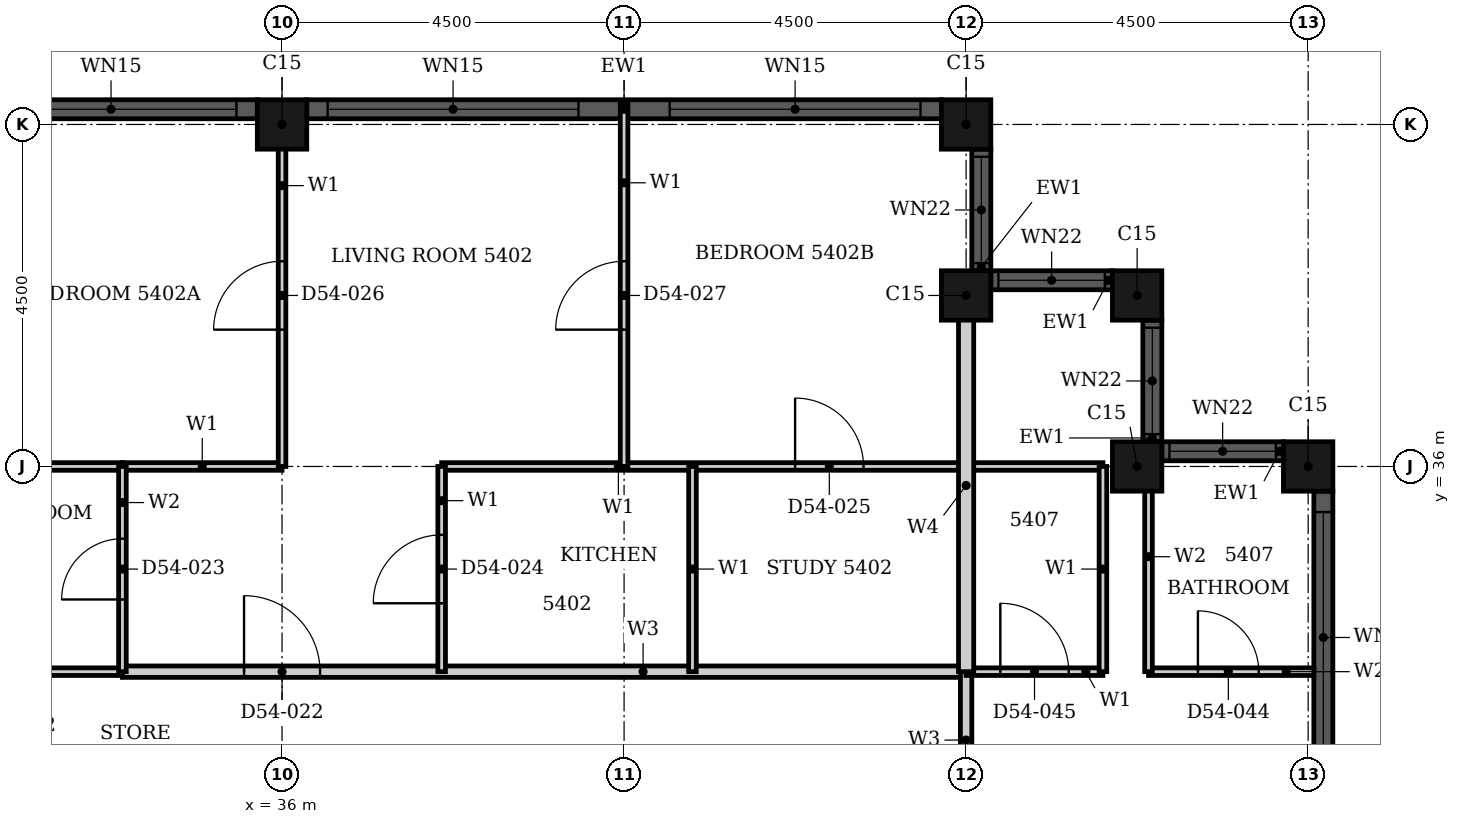
"""IFC4 building model, lengths in metres.
Left out: names, types, materials, properties, quantities, classifications, styles, units other than length and angle.
Written with IfcOpenShell. Run it as: python <this file> out.ifc"""

import sys

from ifc_helpers import new_model, si_unit, direction, frame, frame_2d, origin, origin_2d, place, context, subcontext, project, spatial, rectangle, hollow_rectangle, extrude, element, fill, save


model = new_model("IFC4")
c1 = context("Model", 3, precision=1e-05, world=origin(), true_north=direction((0.0, 1.0)))
c2 = subcontext(c1, "Body", "Model", "MODEL_VIEW")
j1 = project(units=[si_unit("LENGTHUNIT", "METRE"), si_unit("PLANEANGLEUNIT", "RADIAN")], contexts=[c1])
p1 = place(None, origin())
s1 = spatial("IfcSite", under=j1, at=p1, CompositionType="ELEMENT")
p2 = place(p1, origin())
s2 = spatial("IfcBuilding", under=s1, at=p2, CompositionType="ELEMENT")
p3 = place(p2, frame((0.0, 0.0, 214.6)))
s3 = spatial("IfcBuildingStorey", under=s2, at=p3, CompositionType="ELEMENT", Elevation=214.6)
for number, where, z_axis, x_axis in (
    (1, (49.5, 36.0, 0.0), (0.0, 0.0, 1.0), (1.0, 0.0, 0.0)),
    (2, (47.25, 36.0, 0.0), (0.0, 0.0, 1.0), (1.0, 0.0, 0.0)),
    (3, (47.25, 38.25, 0.0), (0.0, 0.0, 1.0), (1.0, 0.0, 0.0)),
    (4, (45.0, 38.25, 0.0), (0.0, 0.0, 1.0), (1.0, 0.0, 0.0)),
    (5, (45.0, 40.5, 0.0), (0.0, 0.0, 1.0), (1.0, 0.0, 0.0)),
    (6, (36.0, 40.5, 0.0), (0.0, 0.0, 1.0), (1.0, 0.0, 0.0)),
):
    element("IfcColumn", number, at=place(p3, frame(where, z_axis=z_axis, x_axis=x_axis)), inside=s3, PredefinedType="COLUMN", context=c2, shape_type="SweptSolid", body=[
        extrude(hollow_rectangle(XDim=0.65, YDim=0.65, WallThickness=0.021, at=origin_2d()), origin(), (0.0, 0.0, 1.0), 3.7),
    ])
p4 = place(p3, frame((49.7, 27.325, 0.0), z_axis=(0.0, 0.0, 1.0), x_axis=(0.0, 1.0, 0.0)))
e7 = element("IfcWall", 7, at=p4, inside=s3, PredefinedType="SOLIDWALL", context=c2, shape_type="SweptSolid", body=[
    extrude(rectangle(XDim=8.35, YDim=0.25, at=frame_2d((4.175, 0.0))), origin(), (0.0, 0.0, 1.0), 3.7),
])
p5 = place(p4, frame((0.275, 0.0, 0.45)))
e8 = element("IfcOpeningElement", 8, at=p5, cuts=e7, PredefinedType="OPENING", context=c2, shape_type="SweptSolid", body=[
    extrude(rectangle(XDim=3.3, YDim=2.3, at=frame_2d((1.65, 1.15))), frame((0.0, 0.135, 0.0), z_axis=(0.0, -1.0, 0.0), x_axis=(1.0, 0.0, 0.0)), (0.0, 0.0, 1.0), 0.27),
])
p6 = place(p4, frame((4.775, 0.0, 0.45)))
e9 = element("IfcOpeningElement", 9, at=p6, cuts=e7, PredefinedType="OPENING", context=c2, shape_type="SweptSolid", body=[
    extrude(rectangle(XDim=3.3, YDim=2.3, at=frame_2d((1.65, 1.15))), frame((0.0, 0.135, 0.0), z_axis=(0.0, -1.0, 0.0), x_axis=(1.0, 0.0, 0.0)), (0.0, 0.0, 1.0), 0.27),
])
p7 = place(p3, frame((49.175, 36.2, 0.0), z_axis=(0.0, 0.0, 1.0), x_axis=(-1.0, 0.0, 0.0)))
e10 = element("IfcWall", 10, at=p7, inside=s3, PredefinedType="SOLIDWALL", context=c2, shape_type="SweptSolid", body=[
    extrude(rectangle(XDim=1.6, YDim=0.25, at=frame_2d((0.8, 0.0))), origin(), (0.0, 0.0, 1.0), 3.7),
])
p8 = place(p7, frame((0.1, 0.0, 0.9)))
e11 = element("IfcOpeningElement", 11, at=p8, cuts=e10, PredefinedType="OPENING", context=c2, shape_type="SweptSolid", body=[
    extrude(rectangle(XDim=1.4, YDim=1.85, at=frame_2d((0.7, 0.925))), frame((0.0, 0.135, 0.0), z_axis=(0.0, -1.0, 0.0), x_axis=(1.0, 0.0, 0.0)), (0.0, 0.0, 1.0), 0.27),
])
p9 = place(p3, frame((47.45, 36.325, 0.0), z_axis=(0.0, 0.0, 1.0), x_axis=(0.0, 1.0, 0.0)))
e12 = element("IfcWall", 12, at=p9, inside=s3, PredefinedType="SOLIDWALL", context=c2, shape_type="SweptSolid", body=[
    extrude(rectangle(XDim=1.6, YDim=0.25, at=frame_2d((0.8, 0.0))), origin(), (0.0, 0.0, 1.0), 3.7),
])
p10 = place(p9, frame((0.1, 0.0, 0.9)))
e13 = element("IfcOpeningElement", 13, at=p10, cuts=e12, PredefinedType="OPENING", context=c2, shape_type="SweptSolid", body=[
    extrude(rectangle(XDim=1.4, YDim=1.85, at=frame_2d((0.7, 0.925))), frame((0.0, 0.135, 0.0), z_axis=(0.0, -1.0, 0.0), x_axis=(1.0, 0.0, 0.0)), (0.0, 0.0, 1.0), 0.27),
])
p11 = place(p3, frame((46.925, 38.45, 0.0), z_axis=(0.0, 0.0, 1.0), x_axis=(-1.0, 0.0, 0.0)))
e14 = element("IfcWall", 14, at=p11, inside=s3, PredefinedType="SOLIDWALL", context=c2, shape_type="SweptSolid", body=[
    extrude(rectangle(XDim=1.6, YDim=0.25, at=frame_2d((0.8, 0.0))), origin(), (0.0, 0.0, 1.0), 3.7),
])
p12 = place(p11, frame((0.1, 0.0, 0.9)))
e15 = element("IfcOpeningElement", 15, at=p12, cuts=e14, PredefinedType="OPENING", context=c2, shape_type="SweptSolid", body=[
    extrude(rectangle(XDim=1.4, YDim=1.85, at=frame_2d((0.7, 0.925))), frame((0.0, 0.135, 0.0), z_axis=(0.0, -1.0, 0.0), x_axis=(1.0, 0.0, 0.0)), (0.0, 0.0, 1.0), 0.27),
])
p13 = place(p3, frame((45.2, 38.575, 0.0), z_axis=(0.0, 0.0, 1.0), x_axis=(0.0, 1.0, 0.0)))
e16 = element("IfcWall", 16, at=p13, inside=s3, PredefinedType="SOLIDWALL", context=c2, shape_type="SweptSolid", body=[
    extrude(rectangle(XDim=1.6, YDim=0.25, at=frame_2d((0.8, 0.0))), origin(), (0.0, 0.0, 1.0), 3.7),
])
p14 = place(p13, frame((0.1, 0.0, 0.9)))
e17 = element("IfcOpeningElement", 17, at=p14, cuts=e16, PredefinedType="OPENING", context=c2, shape_type="SweptSolid", body=[
    extrude(rectangle(XDim=1.4, YDim=1.85, at=frame_2d((0.7, 0.925))), frame((0.0, 0.135, 0.0), z_axis=(0.0, -1.0, 0.0), x_axis=(1.0, 0.0, 0.0)), (0.0, 0.0, 1.0), 0.27),
])
p15 = place(p3, frame((44.675, 40.7, 0.0), z_axis=(0.0, 0.0, 1.0), x_axis=(-1.0, 0.0, 0.0)))
e18 = element("IfcWall", 18, at=p15, inside=s3, PredefinedType="SOLIDWALL", context=c2, shape_type="SweptSolid", body=[
    extrude(rectangle(XDim=8.35, YDim=0.25, at=frame_2d((4.175, 0.0))), origin(), (0.0, 0.0, 1.0), 3.7),
])
p16 = place(p15, frame((0.275, 0.0, 0.45)))
e19 = element("IfcOpeningElement", 19, at=p16, cuts=e18, PredefinedType="OPENING", context=c2, shape_type="SweptSolid", body=[
    extrude(rectangle(XDim=3.3, YDim=2.3, at=frame_2d((1.65, 1.15))), frame((0.0, 0.135, 0.0), z_axis=(0.0, -1.0, 0.0), x_axis=(1.0, 0.0, 0.0)), (0.0, 0.0, 1.0), 0.27),
])
p17 = place(p15, frame((4.775, 0.0, 0.45)))
e20 = element("IfcOpeningElement", 20, at=p17, cuts=e18, PredefinedType="OPENING", context=c2, shape_type="SweptSolid", body=[
    extrude(rectangle(XDim=3.3, YDim=2.3, at=frame_2d((1.65, 1.15))), frame((0.0, 0.135, 0.0), z_axis=(0.0, -1.0, 0.0), x_axis=(1.0, 0.0, 0.0)), (0.0, 0.0, 1.0), 0.27),
])
p18 = place(p3, frame((35.675, 40.7, 0.0), z_axis=(0.0, 0.0, 1.0), x_axis=(-1.0, 0.0, 0.0)))
e21 = element("IfcWall", 21, at=p18, inside=s3, PredefinedType="SOLIDWALL", context=c2, shape_type="SweptSolid", body=[
    extrude(rectangle(XDim=8.35, YDim=0.25, at=frame_2d((4.175, 0.0))), origin(), (0.0, 0.0, 1.0), 3.7),
])
p19 = place(p18, frame((0.275, 0.0, 0.45)))
e22 = element("IfcOpeningElement", 22, at=p19, cuts=e21, PredefinedType="OPENING", context=c2, shape_type="SweptSolid", body=[
    extrude(rectangle(XDim=3.3, YDim=2.3, at=frame_2d((1.65, 1.15))), frame((0.0, 0.135, 0.0), z_axis=(0.0, -1.0, 0.0), x_axis=(1.0, 0.0, 0.0)), (0.0, 0.0, 1.0), 0.27),
])
p20 = place(p18, frame((4.775, 0.0, 0.45)))
e23 = element("IfcOpeningElement", 23, at=p20, cuts=e21, PredefinedType="OPENING", context=c2, shape_type="SweptSolid", body=[
    extrude(rectangle(XDim=3.3, YDim=2.3, at=frame_2d((1.65, 1.15))), frame((0.0, 0.135, 0.0), z_axis=(0.0, -1.0, 0.0), x_axis=(1.0, 0.0, 0.0)), (0.0, 0.0, 1.0), 0.27),
])
p21 = place(p3, frame((33.9, 33.3, 0.0), z_axis=(0.0, 0.0, 1.0), x_axis=(1.0, 0.0, 0.0)))
e24 = element("IfcWall", 24, at=p21, inside=s3, PredefinedType="PARTITIONING", context=c2, shape_type="SweptSolid", body=[
    extrude(rectangle(XDim=11.1, YDim=0.15, at=frame_2d((5.55, 0.0))), origin(), (0.0, 0.0, 1.0), 3.4),
])
p22 = place(p21, frame((1.6, 0.0, 0.0)))
e25 = element("IfcOpeningElement", 25, at=p22, cuts=e24, PredefinedType="OPENING", context=c2, shape_type="SweptSolid", body=[
    extrude(rectangle(XDim=1.0, YDim=2.2, at=frame_2d((0.5, 1.1))), frame((0.0, 0.085, 0.0), z_axis=(0.0, -1.0, 0.0), x_axis=(1.0, 0.0, 0.0)), (0.0, 0.0, 1.0), 0.17),
])
p23 = place(p3, frame((45.0, 31.5, 0.0), z_axis=(0.0, 0.0, 1.0), x_axis=(0.0, 1.0, 0.0)))
e26 = element("IfcWall", 26, at=p23, inside=s3, PredefinedType="PARTITIONING", context=c2, shape_type="SweptSolid", body=[
    extrude(rectangle(XDim=1.8, YDim=0.15, at=frame_2d((0.9, 0.0))), origin(), (0.0, 0.0, 1.0), 3.4),
])
p24 = place(p3, frame((45.0, 33.3, 0.0), z_axis=(0.0, 0.0, 1.0), x_axis=(1.0, 0.0, 0.0)))
e27 = element("IfcWall", 27, at=p24, inside=s3, PredefinedType="PARTITIONING", context=c2, shape_type="SweptSolid", body=[
    extrude(rectangle(XDim=1.8, YDim=0.1, at=frame_2d((0.9, 0.0))), origin(), (0.0, 0.0, 1.0), 3.4),
])
p25 = place(p24, frame((0.45, 0.0, 0.0)))
e28 = element("IfcOpeningElement", 28, at=p25, cuts=e27, PredefinedType="OPENING", context=c2, shape_type="SweptSolid", body=[
    extrude(rectangle(XDim=0.9, YDim=2.1, at=frame_2d((0.45, 1.05))), frame((0.0, 0.06, 0.0), z_axis=(0.0, -1.0, 0.0), x_axis=(1.0, 0.0, 0.0)), (0.0, 0.0, 1.0), 0.12),
])
p26 = place(p3, frame((33.9, 36.0, 0.0), z_axis=(0.0, 0.0, 1.0), x_axis=(1.0, 0.0, 0.0)))
e29 = element("IfcWall", 29, at=p26, inside=s3, PredefinedType="PARTITIONING", context=c2, shape_type="SweptSolid", body=[
    extrude(rectangle(XDim=2.1, YDim=0.1, at=frame_2d((1.05, 0.0))), origin(), (0.0, 0.0, 1.0), 3.4),
])
p27 = place(p3, frame((38.1, 36.0, 0.0), z_axis=(0.0, 0.0, 1.0), x_axis=(1.0, 0.0, 0.0)))
e30 = element("IfcWall", 30, at=p27, inside=s3, PredefinedType="PARTITIONING", context=c2, shape_type="SweptSolid", body=[
    extrude(rectangle(XDim=8.7, YDim=0.1, at=frame_2d((4.35, 0.0))), origin(), (0.0, 0.0, 1.0), 3.4),
])
p28 = place(p27, frame((4.65, 0.0, 0.0)))
e31 = element("IfcOpeningElement", 31, at=p28, cuts=e30, PredefinedType="OPENING", context=c2, shape_type="SweptSolid", body=[
    extrude(rectangle(XDim=0.9, YDim=2.1, at=frame_2d((0.45, 1.05))), frame((0.0, 0.06, 0.0), z_axis=(0.0, -1.0, 0.0), x_axis=(1.0, 0.0, 0.0)), (0.0, 0.0, 1.0), 0.12),
])
p29 = place(p3, frame((36.0, 36.0, 0.0), z_axis=(0.0, 0.0, 1.0), x_axis=(0.0, 1.0, 0.0)))
e32 = element("IfcWall", 32, at=p29, inside=s3, PredefinedType="PARTITIONING", context=c2, shape_type="SweptSolid", body=[
    extrude(rectangle(XDim=4.69, YDim=0.1, at=frame_2d((2.345, 0.0))), origin(), (0.0, 0.0, 1.0), 3.4),
])
p30 = place(p29, frame((1.8, 0.0, 0.0)))
e33 = element("IfcOpeningElement", 33, at=p30, cuts=e32, PredefinedType="OPENING", context=c2, shape_type="SweptSolid", body=[
    extrude(rectangle(XDim=0.9, YDim=2.1, at=frame_2d((0.45, 1.05))), frame((0.0, 0.06, 0.0), z_axis=(0.0, -1.0, 0.0), x_axis=(1.0, 0.0, 0.0)), (0.0, 0.0, 1.0), 0.12),
])
p31 = place(p3, frame((38.1, 33.3, 0.0), z_axis=(0.0, 0.0, 1.0), x_axis=(0.0, 1.0, 0.0)))
e34 = element("IfcWall", 34, at=p31, inside=s3, PredefinedType="PARTITIONING", context=c2, shape_type="SweptSolid", body=[
    extrude(rectangle(XDim=2.7, YDim=0.1, at=frame_2d((1.35, 0.0))), origin(), (0.0, 0.0, 1.0), 3.4),
])
p32 = place(p31, frame((0.9, 0.0, 0.0)))
e35 = element("IfcOpeningElement", 35, at=p32, cuts=e34, PredefinedType="OPENING", context=c2, shape_type="SweptSolid", body=[
    extrude(rectangle(XDim=0.9, YDim=2.1, at=frame_2d((0.45, 1.05))), frame((0.0, 0.06, 0.0), z_axis=(0.0, -1.0, 0.0), x_axis=(1.0, 0.0, 0.0)), (0.0, 0.0, 1.0), 0.12),
])
p33 = place(p3, frame((40.5, 36.0, 0.0), z_axis=(0.0, 0.0, 1.0), x_axis=(0.0, 1.0, 0.0)))
e36 = element("IfcWall", 36, at=p33, inside=s3, PredefinedType="PARTITIONING", context=c2, shape_type="SweptSolid", body=[
    extrude(rectangle(XDim=4.765, YDim=0.1, at=frame_2d((2.382, 0.0))), origin(), (0.0, 0.0, 1.0), 3.4),
])
p34 = place(p33, frame((1.8, 0.0, 0.0)))
e37 = element("IfcOpeningElement", 37, at=p34, cuts=e36, PredefinedType="OPENING", context=c2, shape_type="SweptSolid", body=[
    extrude(rectangle(XDim=0.9, YDim=2.1, at=frame_2d((0.45, 1.05))), frame((0.0, 0.06, 0.0), z_axis=(0.0, -1.0, 0.0), x_axis=(1.0, 0.0, 0.0)), (0.0, 0.0, 1.0), 0.12),
])
for number, where, z_axis, x_axis in (
    (38, (41.4, 33.3, 0.0), (0.0, 0.0, 1.0), (0.0, 1.0, 0.0)),
    (39, (46.8, 33.3, 0.0), (0.0, 0.0, 1.0), (0.0, 1.0, 0.0)),
):
    element("IfcWall", number, at=place(p3, frame(where, z_axis=z_axis, x_axis=x_axis)), inside=s3, PredefinedType="PARTITIONING", context=c2, shape_type="SweptSolid", body=[
        extrude(rectangle(XDim=2.7, YDim=0.1, at=frame_2d((1.35, 0.0))), origin(), (0.0, 0.0, 1.0), 3.4),
    ])
p35 = place(p3, frame((45.0, 33.3, 0.0), z_axis=(0.0, 0.0, 1.0), x_axis=(0.0, 1.0, 0.0)))
e40 = element("IfcWall", 40, at=p35, inside=s3, PredefinedType="PARTITIONING", context=c2, shape_type="SweptSolid", body=[
    extrude(rectangle(XDim=4.9, YDim=0.2, at=frame_2d((2.45, 0.0))), origin(), (0.0, 0.0, 1.0), 3.4),
])
p36 = place(p3, frame((31.5, 33.3, 0.0), z_axis=(0.0, 0.0, 1.0), x_axis=(1.0, 0.0, 0.0)))
e41 = element("IfcWall", 41, at=p36, inside=s3, PredefinedType="PARTITIONING", context=c2, shape_type="SweptSolid", body=[
    extrude(rectangle(XDim=2.4, YDim=0.1, at=frame_2d((1.2, 0.0))), origin(), (0.0, 0.0, 1.0), 3.4),
])
p37 = place(p3, frame((47.4, 33.3, 0.0), z_axis=(0.0, 0.0, 1.0), x_axis=(1.0, 0.0, 0.0)))
e42 = element("IfcWall", 42, at=p37, inside=s3, PredefinedType="PARTITIONING", context=c2, shape_type="SweptSolid", body=[
    extrude(rectangle(XDim=2.175, YDim=0.1, at=frame_2d((1.087, 0.0))), origin(), (0.0, 0.0, 1.0), 3.4),
])
p38 = place(p37, frame((0.65, 0.0, 0.0)))
e43 = element("IfcOpeningElement", 43, at=p38, cuts=e42, PredefinedType="OPENING", context=c2, shape_type="SweptSolid", body=[
    extrude(rectangle(XDim=0.8, YDim=2.1, at=frame_2d((0.4, 1.05))), frame((0.0, 0.06, 0.0), z_axis=(0.0, -1.0, 0.0), x_axis=(1.0, 0.0, 0.0)), (0.0, 0.0, 1.0), 0.12),
])
p39 = place(p3, frame((31.5, 36.0, 0.0), z_axis=(0.0, 0.0, 1.0), x_axis=(1.0, 0.0, 0.0)))
e44 = element("IfcWall", 44, at=p39, inside=s3, PredefinedType="PARTITIONING", context=c2, shape_type="SweptSolid", body=[
    extrude(rectangle(XDim=2.4, YDim=0.1, at=frame_2d((1.2, 0.0))), origin(), (0.0, 0.0, 1.0), 3.4),
])
p40 = place(p3, frame((33.9, 33.3, 0.0), z_axis=(0.0, 0.0, 1.0), x_axis=(0.0, 1.0, 0.0)))
e45 = element("IfcWall", 45, at=p40, inside=s3, PredefinedType="PARTITIONING", context=c2, shape_type="SweptSolid", body=[
    extrude(rectangle(XDim=2.7, YDim=0.1, at=frame_2d((1.35, 0.0))), origin(), (0.0, 0.0, 1.0), 3.4),
])
p41 = place(p40, frame((0.95, 0.0, 0.0)))
e46 = element("IfcOpeningElement", 46, at=p41, cuts=e45, PredefinedType="OPENING", context=c2, shape_type="SweptSolid", body=[
    extrude(rectangle(XDim=0.8, YDim=2.1, at=frame_2d((0.4, 1.05))), frame((0.0, 0.06, 0.0), z_axis=(0.0, -1.0, 0.0), x_axis=(1.0, 0.0, 0.0)), (0.0, 0.0, 1.0), 0.12),
])
p42 = place(p3, frame((47.4, 33.3, 0.0), z_axis=(0.0, 0.0, 1.0), x_axis=(0.0, 1.0, 0.0)))
e47 = element("IfcWall", 47, at=p42, inside=s3, PredefinedType="PARTITIONING", context=c2, shape_type="SweptSolid", body=[
    extrude(rectangle(XDim=3.025, YDim=0.1, at=frame_2d((1.512, 0.0))), origin(), (0.0, 0.0, 1.0), 3.4),
])
p43 = place(p6, origin())
e48 = element("IfcWindow", 48, at=p43, inside=s3, PartitioningType="SINGLE_PANEL", PredefinedType="WINDOW", context=c2, shape_type="SweptSolid", body=[
    extrude(rectangle(XDim=3.3, YDim=2.3, at=frame_2d((1.65, 1.15))), frame((0.0, 0.03, 0.0), z_axis=(0.0, -1.0, 0.0), x_axis=(1.0, 0.0, 0.0)), (0.0, 0.0, 1.0), 0.06),
])
fill(e9, e48)
p44 = place(p8, origin())
e49 = element("IfcWindow", 49, at=p44, inside=s3, PartitioningType="SINGLE_PANEL", PredefinedType="WINDOW", context=c2, shape_type="SweptSolid", body=[
    extrude(rectangle(XDim=1.4, YDim=1.85, at=frame_2d((0.7, 0.925))), frame((0.0, 0.03, 0.0), z_axis=(0.0, -1.0, 0.0), x_axis=(1.0, 0.0, 0.0)), (0.0, 0.0, 1.0), 0.06),
])
fill(e11, e49)
p45 = place(p10, origin())
e50 = element("IfcWindow", 50, at=p45, inside=s3, PartitioningType="SINGLE_PANEL", PredefinedType="WINDOW", context=c2, shape_type="SweptSolid", body=[
    extrude(rectangle(XDim=1.4, YDim=1.85, at=frame_2d((0.7, 0.925))), frame((0.0, 0.03, 0.0), z_axis=(0.0, -1.0, 0.0), x_axis=(1.0, 0.0, 0.0)), (0.0, 0.0, 1.0), 0.06),
])
fill(e13, e50)
p46 = place(p12, origin())
e51 = element("IfcWindow", 51, at=p46, inside=s3, PartitioningType="SINGLE_PANEL", PredefinedType="WINDOW", context=c2, shape_type="SweptSolid", body=[
    extrude(rectangle(XDim=1.4, YDim=1.85, at=frame_2d((0.7, 0.925))), frame((0.0, 0.03, 0.0), z_axis=(0.0, -1.0, 0.0), x_axis=(1.0, 0.0, 0.0)), (0.0, 0.0, 1.0), 0.06),
])
fill(e15, e51)
p47 = place(p14, origin())
e52 = element("IfcWindow", 52, at=p47, inside=s3, PartitioningType="SINGLE_PANEL", PredefinedType="WINDOW", context=c2, shape_type="SweptSolid", body=[
    extrude(rectangle(XDim=1.4, YDim=1.85, at=frame_2d((0.7, 0.925))), frame((0.0, 0.03, 0.0), z_axis=(0.0, -1.0, 0.0), x_axis=(1.0, 0.0, 0.0)), (0.0, 0.0, 1.0), 0.06),
])
fill(e17, e52)
p48 = place(p16, origin())
e53 = element("IfcWindow", 53, at=p48, inside=s3, PartitioningType="SINGLE_PANEL", PredefinedType="WINDOW", context=c2, shape_type="SweptSolid", body=[
    extrude(rectangle(XDim=3.3, YDim=2.3, at=frame_2d((1.65, 1.15))), frame((0.0, 0.03, 0.0), z_axis=(0.0, -1.0, 0.0), x_axis=(1.0, 0.0, 0.0)), (0.0, 0.0, 1.0), 0.06),
])
fill(e19, e53)
p49 = place(p17, origin())
e54 = element("IfcWindow", 54, at=p49, inside=s3, PartitioningType="SINGLE_PANEL", PredefinedType="WINDOW", context=c2, shape_type="SweptSolid", body=[
    extrude(rectangle(XDim=3.3, YDim=2.3, at=frame_2d((1.65, 1.15))), frame((0.0, 0.03, 0.0), z_axis=(0.0, -1.0, 0.0), x_axis=(1.0, 0.0, 0.0)), (0.0, 0.0, 1.0), 0.06),
])
fill(e20, e54)
p50 = place(p19, origin())
e55 = element("IfcWindow", 55, at=p50, inside=s3, PartitioningType="SINGLE_PANEL", PredefinedType="WINDOW", context=c2, shape_type="SweptSolid", body=[
    extrude(rectangle(XDim=3.3, YDim=2.3, at=frame_2d((1.65, 1.15))), frame((0.0, 0.03, 0.0), z_axis=(0.0, -1.0, 0.0), x_axis=(1.0, 0.0, 0.0)), (0.0, 0.0, 1.0), 0.06),
])
fill(e22, e55)
p51 = place(p22, origin())
e56 = element("IfcDoor", 56, at=p51, inside=s3, OperationType="SINGLE_SWING_LEFT", PredefinedType="DOOR", context=c2, shape_type="SweptSolid", body=[
    extrude(rectangle(XDim=1.0, YDim=2.2, at=frame_2d((0.5, 1.1))), frame((0.0, 0.025, 0.0), z_axis=(0.0, -1.0, 0.0), x_axis=(1.0, 0.0, 0.0)), (0.0, 0.0, 1.0), 0.05),
])
fill(e25, e56)
p52 = place(p41, origin())
e57 = element("IfcDoor", 57, at=p52, inside=s3, OperationType="SINGLE_SWING_LEFT", PredefinedType="DOOR", context=c2, shape_type="SweptSolid", body=[
    extrude(rectangle(XDim=0.8, YDim=2.1, at=frame_2d((0.4, 1.05))), frame((0.0, 0.025, 0.0), z_axis=(0.0, -1.0, 0.0), x_axis=(1.0, 0.0, 0.0)), (0.0, 0.0, 1.0), 0.05),
])
fill(e46, e57)
p53 = place(p32, origin())
e58 = element("IfcDoor", 58, at=p53, inside=s3, OperationType="SINGLE_SWING_LEFT", PredefinedType="DOOR", context=c2, shape_type="SweptSolid", body=[
    extrude(rectangle(XDim=0.9, YDim=2.1, at=frame_2d((0.45, 1.05))), frame((0.0, 0.025, 0.0), z_axis=(0.0, -1.0, 0.0), x_axis=(1.0, 0.0, 0.0)), (0.0, 0.0, 1.0), 0.05),
])
fill(e35, e58)
p54 = place(p28, origin())
e59 = element("IfcDoor", 59, at=p54, inside=s3, OperationType="SINGLE_SWING_LEFT", PredefinedType="DOOR", context=c2, shape_type="SweptSolid", body=[
    extrude(rectangle(XDim=0.9, YDim=2.1, at=frame_2d((0.45, 1.05))), frame((0.0, 0.025, 0.0), z_axis=(0.0, -1.0, 0.0), x_axis=(1.0, 0.0, 0.0)), (0.0, 0.0, 1.0), 0.05),
])
fill(e31, e59)
p55 = place(p30, origin())
e60 = element("IfcDoor", 60, at=p55, inside=s3, OperationType="SINGLE_SWING_RIGHT", PredefinedType="DOOR", context=c2, shape_type="SweptSolid", body=[
    extrude(rectangle(XDim=0.9, YDim=2.1, at=frame_2d((0.45, 1.05))), frame((0.0, 0.025, 0.0), z_axis=(0.0, -1.0, 0.0), x_axis=(1.0, 0.0, 0.0)), (0.0, 0.0, 1.0), 0.05),
])
fill(e33, e60)
p56 = place(p34, origin())
e61 = element("IfcDoor", 61, at=p56, inside=s3, OperationType="SINGLE_SWING_LEFT", PredefinedType="DOOR", context=c2, shape_type="SweptSolid", body=[
    extrude(rectangle(XDim=0.9, YDim=2.1, at=frame_2d((0.45, 1.05))), frame((0.0, 0.025, 0.0), z_axis=(0.0, -1.0, 0.0), x_axis=(1.0, 0.0, 0.0)), (0.0, 0.0, 1.0), 0.05),
])
fill(e37, e61)
p57 = place(p38, origin())
e62 = element("IfcDoor", 62, at=p57, inside=s3, OperationType="SINGLE_SWING_RIGHT", PredefinedType="DOOR", context=c2, shape_type="SweptSolid", body=[
    extrude(rectangle(XDim=0.8, YDim=2.1, at=frame_2d((0.4, 1.05))), frame((0.0, 0.025, 0.0), z_axis=(0.0, -1.0, 0.0), x_axis=(1.0, 0.0, 0.0)), (0.0, 0.0, 1.0), 0.05),
])
fill(e43, e62)
p58 = place(p25, origin())
e63 = element("IfcDoor", 63, at=p58, inside=s3, OperationType="SINGLE_SWING_LEFT", PredefinedType="DOOR", context=c2, shape_type="SweptSolid", body=[
    extrude(rectangle(XDim=0.9, YDim=2.1, at=frame_2d((0.45, 1.05))), frame((0.0, 0.025, 0.0), z_axis=(0.0, -1.0, 0.0), x_axis=(1.0, 0.0, 0.0)), (0.0, 0.0, 1.0), 0.05),
])
fill(e28, e63)
save(model, sys.argv[1])
